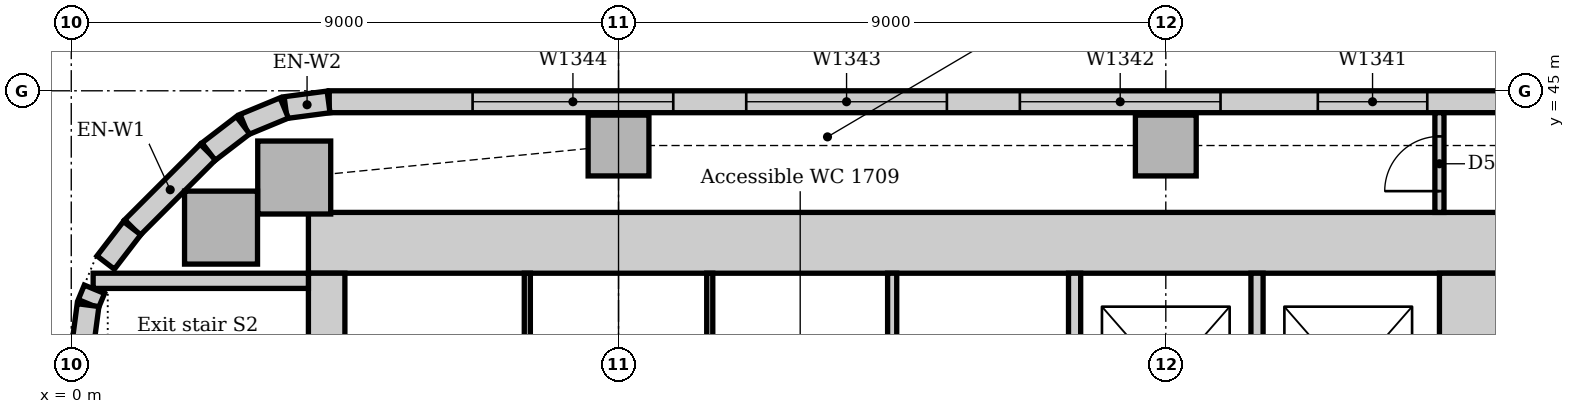
"""IFC4 building model, lengths in metres.
Left out: names, types, materials, properties, quantities, classifications, styles, units other than length and angle.
Written with IfcOpenShell. Run it as: python <this file> out.ifc"""

import sys

from ifc_helpers import new_model, si_unit, direction, frame, frame_2d, origin, origin_2d, place, context, subcontext, project, spatial, rectangle, extrude, element, fill, save


model = new_model("IFC4")
c1 = context("Model", 3, precision=1e-05, world=origin(), true_north=direction((0.0, 1.0)))
c2 = subcontext(c1, "Body", "Model", "MODEL_VIEW")
j1 = project(units=[si_unit("LENGTHUNIT", "METRE"), si_unit("PLANEANGLEUNIT", "RADIAN")], contexts=[c1])
p1 = place(None, origin())
s1 = spatial("IfcSite", under=j1, at=p1, CompositionType="ELEMENT")
p2 = place(p1, origin())
s2 = spatial("IfcBuilding", under=s1, at=p2, CompositionType="ELEMENT")
p3 = place(p2, frame((0.0, 0.0, 75.0)))
s3 = spatial("IfcBuildingStorey", under=s2, at=p3, CompositionType="ELEMENT", Elevation=75.0)
p4 = place(p3, frame((23.5, 42.5, 0.0), z_axis=(0.0, 0.0, 1.0), x_axis=(-1.0, 0.0, 0.0)))
e1 = element("IfcWall", 1, at=p4, inside=s3, PredefinedType="SOLIDWALL", context=c2, shape_type="SweptSolid", body=[
    extrude(rectangle(XDim=19.6, YDim=1.0, at=frame_2d((9.8, 0.0))), origin(), (0.0, 0.0, 1.0), 4.0),
])
p5 = place(p3, frame((23.0, 31.5, 0.0), z_axis=(0.0, 0.0, 1.0), x_axis=(0.0, 1.0, 0.0)))
e2 = element("IfcWall", 2, at=p5, inside=s3, PredefinedType="SOLIDWALL", context=c2, shape_type="SweptSolid", body=[
    extrude(rectangle(XDim=10.5, YDim=1.0, at=frame_2d((5.25, 0.0))), origin(), (0.0, 0.0, 1.0), 4.0),
])
p6 = place(p5, frame((3.15, 0.0, 0.0)))
e3 = element("IfcOpeningElement", 3, at=p6, cuts=e2, PredefinedType="OPENING", context=c2, shape_type="SweptSolid", body=[
    extrude(rectangle(XDim=1.0, YDim=2.1, at=frame_2d((0.5, 1.05))), frame((0.0, 0.51, 0.0), z_axis=(0.0, -1.0, 0.0), x_axis=(1.0, 0.0, 0.0)), (0.0, 0.0, 1.0), 1.02),
])
p7 = place(p5, frame((5.2, 0.0, 0.0)))
e4 = element("IfcOpeningElement", 4, at=p7, cuts=e2, PredefinedType="OPENING", context=c2, shape_type="SweptSolid", body=[
    extrude(rectangle(XDim=1.0, YDim=2.1, at=frame_2d((0.5, 1.05))), frame((0.0, 0.51, 0.0), z_axis=(0.0, -1.0, 0.0), x_axis=(1.0, 0.0, 0.0)), (0.0, 0.0, 1.0), 1.02),
])
p8 = place(p3, frame((4.2, 42.0, 0.0), z_axis=(0.0, 0.0, 1.0), x_axis=(0.0, -1.0, 0.0)))
e5 = element("IfcWall", 5, at=p8, inside=s3, PredefinedType="SOLIDWALL", context=c2, shape_type="SweptSolid", body=[
    extrude(rectangle(XDim=10.5, YDim=0.6, at=frame_2d((5.25, 0.0))), origin(), (0.0, 0.0, 1.0), 4.0),
])
p9 = place(p8, frame((5.3, 0.0, 0.0)))
e6 = element("IfcOpeningElement", 6, at=p9, cuts=e5, PredefinedType="OPENING", context=c2, shape_type="SweptSolid", body=[
    extrude(rectangle(XDim=1.0, YDim=2.1, at=frame_2d((0.5, 1.05))), frame((0.0, 0.31, 0.0), z_axis=(0.0, -1.0, 0.0), x_axis=(1.0, 0.0, 0.0)), (0.0, 0.0, 1.0), 0.62),
])
p10 = place(p3, frame((3.9, 41.875, 0.0), z_axis=(0.0, 0.0, 1.0), x_axis=(-1.0, 0.0, 0.0)))
e7 = element("IfcWall", 7, at=p10, inside=s3, PredefinedType="SOLIDWALL", context=c2, shape_type="SweptSolid", body=[
    extrude(rectangle(XDim=3.54, YDim=0.25, at=frame_2d((1.77, 0.0))), origin(), (0.0, 0.0, 1.0), 4.0),
])
for number, where, z_axis, x_axis in (
    (8, (3.667, 43.574, 0.0), (0.0, 0.0, 1.0), (1.0, 0.0, 0.0)),
    (9, (2.463, 42.75, 0.0), (0.0, 0.0, 1.0), (1.0, 0.0, 0.0)),
):
    element("IfcColumn", number, at=place(p3, frame(where, z_axis=z_axis, x_axis=x_axis)), inside=s3, PredefinedType="COLUMN", context=c2, shape_type="SweptSolid", body=[
        extrude(rectangle(XDim=1.2, YDim=1.2, at=origin_2d()), origin(), (0.0, 0.0, 1.0), 3.85),
    ])
for number, where, z_axis, x_axis in (
    (10, (9.0, 44.1, 0.0), (0.0, 0.0, 1.0), (1.0, 0.0, 0.0)),
    (11, (18.0, 44.1, 0.0), (0.0, 0.0, 1.0), (1.0, 0.0, 0.0)),
):
    element("IfcColumn", number, at=place(p3, frame(where, z_axis=z_axis, x_axis=x_axis)), inside=s3, PredefinedType="COLUMN", context=c2, shape_type="SweptSolid", body=[
        extrude(rectangle(XDim=1.0, YDim=1.0, at=origin_2d()), origin(), (0.0, 0.0, 1.0), 3.85),
    ])
p11 = place(p3, frame((48.257, 44.82, 0.0), z_axis=(0.0, 0.0, 1.0), x_axis=(-1.0, 0.0, 0.0)))
e12 = element("IfcWall", 12, at=p11, inside=s3, PredefinedType="STANDARD", context=c2, shape_type="SweptSolid", body=[
    extrude(rectangle(XDim=44.015, YDim=0.36, at=frame_2d((22.007, 0.0))), origin(), (0.0, 0.0, 1.0), 3.85),
])
p12 = place(p11, frame((2.357, 0.0, 0.9)))
e13 = element("IfcOpeningElement", 13, at=p12, cuts=e12, PredefinedType="OPENING", context=c2, shape_type="SweptSolid", body=[
    extrude(rectangle(XDim=3.3, YDim=1.6, at=frame_2d((1.65, 0.8))), frame((0.0, 0.19, 0.0), z_axis=(0.0, -1.0, 0.0), x_axis=(1.0, 0.0, 0.0)), (0.0, 0.0, 1.0), 0.38),
])
p13 = place(p11, frame((6.857, 0.0, 0.9)))
e14 = element("IfcOpeningElement", 14, at=p13, cuts=e12, PredefinedType="OPENING", context=c2, shape_type="SweptSolid", body=[
    extrude(rectangle(XDim=3.3, YDim=1.6, at=frame_2d((1.65, 0.8))), frame((0.0, 0.19, 0.0), z_axis=(0.0, -1.0, 0.0), x_axis=(1.0, 0.0, 0.0)), (0.0, 0.0, 1.0), 0.38),
])
p14 = place(p11, frame((11.357, 0.0, 0.9)))
e15 = element("IfcOpeningElement", 15, at=p14, cuts=e12, PredefinedType="OPENING", context=c2, shape_type="SweptSolid", body=[
    extrude(rectangle(XDim=3.3, YDim=1.6, at=frame_2d((1.65, 0.8))), frame((0.0, 0.19, 0.0), z_axis=(0.0, -1.0, 0.0), x_axis=(1.0, 0.0, 0.0)), (0.0, 0.0, 1.0), 0.38),
])
p15 = place(p11, frame((15.857, 0.0, 0.9)))
e16 = element("IfcOpeningElement", 16, at=p15, cuts=e12, PredefinedType="OPENING", context=c2, shape_type="SweptSolid", body=[
    extrude(rectangle(XDim=3.3, YDim=1.6, at=frame_2d((1.65, 0.8))), frame((0.0, 0.19, 0.0), z_axis=(0.0, -1.0, 0.0), x_axis=(1.0, 0.0, 0.0)), (0.0, 0.0, 1.0), 0.38),
])
p16 = place(p11, frame((20.357, 0.0, 0.9)))
e17 = element("IfcOpeningElement", 17, at=p16, cuts=e12, PredefinedType="OPENING", context=c2, shape_type="SweptSolid", body=[
    extrude(rectangle(XDim=3.3, YDim=1.6, at=frame_2d((1.65, 0.8))), frame((0.0, 0.19, 0.0), z_axis=(0.0, -1.0, 0.0), x_axis=(1.0, 0.0, 0.0)), (0.0, 0.0, 1.0), 0.38),
])
p17 = place(p11, frame((25.957, 0.0, 0.9)))
e18 = element("IfcOpeningElement", 18, at=p17, cuts=e12, PredefinedType="OPENING", context=c2, shape_type="SweptSolid", body=[
    extrude(rectangle(XDim=1.8, YDim=1.6, at=frame_2d((0.9, 0.8))), frame((0.0, 0.19, 0.0), z_axis=(0.0, -1.0, 0.0), x_axis=(1.0, 0.0, 0.0)), (0.0, 0.0, 1.0), 0.38),
])
p18 = place(p11, frame((29.357, 0.0, 0.9)))
e19 = element("IfcOpeningElement", 19, at=p18, cuts=e12, PredefinedType="OPENING", context=c2, shape_type="SweptSolid", body=[
    extrude(rectangle(XDim=3.3, YDim=1.6, at=frame_2d((1.65, 0.8))), frame((0.0, 0.19, 0.0), z_axis=(0.0, -1.0, 0.0), x_axis=(1.0, 0.0, 0.0)), (0.0, 0.0, 1.0), 0.38),
])
p19 = place(p11, frame((33.857, 0.0, 0.9)))
e20 = element("IfcOpeningElement", 20, at=p19, cuts=e12, PredefinedType="OPENING", context=c2, shape_type="SweptSolid", body=[
    extrude(rectangle(XDim=3.3, YDim=1.6, at=frame_2d((1.65, 0.8))), frame((0.0, 0.19, 0.0), z_axis=(0.0, -1.0, 0.0), x_axis=(1.0, 0.0, 0.0)), (0.0, 0.0, 1.0), 0.38),
])
p20 = place(p11, frame((38.357, 0.0, 0.9)))
e21 = element("IfcOpeningElement", 21, at=p20, cuts=e12, PredefinedType="OPENING", context=c2, shape_type="SweptSolid", body=[
    extrude(rectangle(XDim=3.3, YDim=1.6, at=frame_2d((1.65, 0.8))), frame((0.0, 0.19, 0.0), z_axis=(0.0, -1.0, 0.0), x_axis=(1.0, 0.0, 0.0)), (0.0, 0.0, 1.0), 0.38),
])
p21 = place(p3, frame((2.249, 43.994, 0.0), z_axis=(0.0, 0.0, 1.0), x_axis=(-0.707106781187, -0.707106781187, 0.0)))
e22 = element("IfcWall", 22, at=p21, inside=s3, PredefinedType="STANDARD", context=c2, shape_type="SweptSolid", body=[
    extrude(rectangle(XDim=1.757, YDim=0.36, at=frame_2d((0.879, 0.0))), origin(), (0.0, 0.0, 1.0), 3.85),
])
for number, where, z_axis, x_axis in (
    (23, (4.231, 44.817, 0.0), (0.0, 0.0, 1.0), (-0.991, -0.131, 0.0)),
    (24, (3.503, 44.718, 0.0), (0.0, 0.0, 1.0), (-0.924, -0.383, 0.0)),
):
    element("IfcWall", number, at=place(p3, frame(where, z_axis=z_axis, x_axis=x_axis)), inside=s3, PredefinedType="STANDARD", context=c2, shape_type="SweptSolid", body=[
        extrude(rectangle(XDim=0.713, YDim=0.36, at=frame_2d((0.356, 0.0))), origin(), (0.0, 0.0, 1.0), 3.85),
    ])
for number, where, z_axis, x_axis in (
    (25, (2.825, 44.434, 0.0), (0.0, 0.0, 1.0), (-0.793, -0.609, 0.0)),
    (26, (1.0, 42.741, 0.0), (0.0, 0.0, 1.0), (-0.609, -0.793, 0.0)),
):
    element("IfcWall", number, at=place(p3, frame(where, z_axis=z_axis, x_axis=x_axis)), inside=s3, PredefinedType="STANDARD", context=c2, shape_type="SweptSolid", body=[
        extrude(rectangle(XDim=0.713, YDim=0.36, at=frame_2d((0.357, 0.0))), origin(), (0.0, 0.0, 1.0), 3.85),
    ])
p22 = place(p3, frame((0.381, 41.736, 0.0), z_axis=(0.0, 0.0, 1.0), x_axis=(-0.382773360986, -0.923842277729, 0.0)))
e27 = element("IfcWall", 27, at=p22, inside=s3, PredefinedType="STANDARD", context=c2, shape_type="SweptSolid", body=[
    extrude(rectangle(XDim=0.258, YDim=0.36, at=frame_2d((0.129, 0.0))), origin(), (0.0, 0.0, 1.0), 3.85),
])
p23 = place(p3, frame((0.276, 41.476, 0.0), z_axis=(0.0, 0.0, 1.0), x_axis=(-0.13055608231, -0.99144092581, 0.0)))
e28 = element("IfcWall", 28, at=p23, inside=s3, PredefinedType="STANDARD", context=c2, shape_type="SweptSolid", body=[
    extrude(rectangle(XDim=0.713, YDim=0.36, at=frame_2d((0.356, 0.0))), origin(), (0.0, 0.0, 1.0), 3.85),
])
for number, where, z_axis, x_axis in (
    (29, (16.5, 38.6, 0.0), (0.0, 0.0, 1.0), (0.0, 1.0, 0.0)),
    (30, (19.5, 38.6, 0.0), (0.0, 0.0, 1.0), (0.0, 1.0, 0.0)),
):
    element("IfcWall", number, at=place(p3, frame(where, z_axis=z_axis, x_axis=x_axis)), inside=s3, PredefinedType="PARTITIONING", context=c2, shape_type="SweptSolid", body=[
        extrude(rectangle(XDim=3.4, YDim=0.2, at=frame_2d((1.7, 0.0))), origin(), (0.0, 0.0, 1.0), 3.85),
    ])
p24 = place(p3, frame((22.5, 43.0, 0.0), z_axis=(0.0, 0.0, 1.0), x_axis=(0.0, 1.0, 0.0)))
e31 = element("IfcWall", 31, at=p24, inside=s3, PredefinedType="PARTITIONING", context=c2, shape_type="SweptSolid", body=[
    extrude(rectangle(XDim=1.64, YDim=0.15, at=frame_2d((0.82, 0.0))), origin(), (0.0, 0.0, 1.0), 3.85),
])
p25 = place(p24, frame((0.35, 0.0, 0.0)))
e32 = element("IfcOpeningElement", 32, at=p25, cuts=e31, PredefinedType="OPENING", context=c2, shape_type="SweptSolid", body=[
    extrude(rectangle(XDim=0.9, YDim=2.1, at=frame_2d((0.45, 1.05))), frame((0.0, 0.085, 0.0), z_axis=(0.0, -1.0, 0.0), x_axis=(1.0, 0.0, 0.0)), (0.0, 0.0, 1.0), 0.17),
])
p26 = place(p3, frame((13.5, 38.575, 0.0), z_axis=(0.0, 0.0, 1.0), x_axis=(0.0, 1.0, 0.0)))
e33 = element("IfcWall", 33, at=p26, inside=s3, PredefinedType="PARTITIONING", context=c2, shape_type="SweptSolid", body=[
    extrude(rectangle(XDim=3.425, YDim=0.15, at=frame_2d((1.712, 0.0))), origin(), (0.0, 0.0, 1.0), 3.85),
])
for number, where, z_axis, x_axis in (
    (34, (7.5, 38.575, 0.0), (0.0, 0.0, 1.0), (0.0, 1.0, 0.0)),
    (35, (10.5, 38.575, 0.0), (0.0, 0.0, 1.0), (0.0, 1.0, 0.0)),
):
    element("IfcWall", number, at=place(p3, frame(where, z_axis=z_axis, x_axis=x_axis)), inside=s3, PredefinedType="PARTITIONING", context=c2, shape_type="SweptSolid", body=[
        extrude(rectangle(XDim=3.425, YDim=0.1, at=frame_2d((1.712, 0.0))), origin(), (0.0, 0.0, 1.0), 3.85),
    ])
p27 = place(p17, origin())
e36 = element("IfcWindow", 36, at=p27, inside=s3, PartitioningType="SINGLE_PANEL", PredefinedType="WINDOW", context=c2, shape_type="SweptSolid", body=[
    extrude(rectangle(XDim=1.8, YDim=1.6, at=frame_2d((0.9, 0.8))), frame((0.0, 0.13, 0.0), z_axis=(0.0, -1.0, 0.0), x_axis=(1.0, 0.0, 0.0)), (0.0, 0.0, 1.0), 0.06),
])
fill(e18, e36)
p28 = place(p18, origin())
e37 = element("IfcWindow", 37, at=p28, inside=s3, PartitioningType="SINGLE_PANEL", PredefinedType="WINDOW", context=c2, shape_type="SweptSolid", body=[
    extrude(rectangle(XDim=3.3, YDim=1.6, at=frame_2d((1.65, 0.8))), frame((0.0, 0.13, 0.0), z_axis=(0.0, -1.0, 0.0), x_axis=(1.0, 0.0, 0.0)), (0.0, 0.0, 1.0), 0.06),
])
fill(e19, e37)
p29 = place(p19, origin())
e38 = element("IfcWindow", 38, at=p29, inside=s3, PartitioningType="SINGLE_PANEL", PredefinedType="WINDOW", context=c2, shape_type="SweptSolid", body=[
    extrude(rectangle(XDim=3.3, YDim=1.6, at=frame_2d((1.65, 0.8))), frame((0.0, 0.13, 0.0), z_axis=(0.0, -1.0, 0.0), x_axis=(1.0, 0.0, 0.0)), (0.0, 0.0, 1.0), 0.06),
])
fill(e20, e38)
p30 = place(p20, origin())
e39 = element("IfcWindow", 39, at=p30, inside=s3, PartitioningType="SINGLE_PANEL", PredefinedType="WINDOW", context=c2, shape_type="SweptSolid", body=[
    extrude(rectangle(XDim=3.3, YDim=1.6, at=frame_2d((1.65, 0.8))), frame((0.0, 0.13, 0.0), z_axis=(0.0, -1.0, 0.0), x_axis=(1.0, 0.0, 0.0)), (0.0, 0.0, 1.0), 0.06),
])
fill(e21, e39)
p31 = place(p25, origin())
e40 = element("IfcDoor", 40, at=p31, inside=s3, OperationType="SINGLE_SWING_LEFT", PredefinedType="DOOR", context=c2, shape_type="SweptSolid", body=[
    extrude(rectangle(XDim=0.9, YDim=2.1, at=frame_2d((0.45, 1.05))), frame((0.0, 0.025, 0.0), z_axis=(0.0, -1.0, 0.0), x_axis=(1.0, 0.0, 0.0)), (0.0, 0.0, 1.0), 0.05),
])
fill(e32, e40)
save(model, sys.argv[1])
